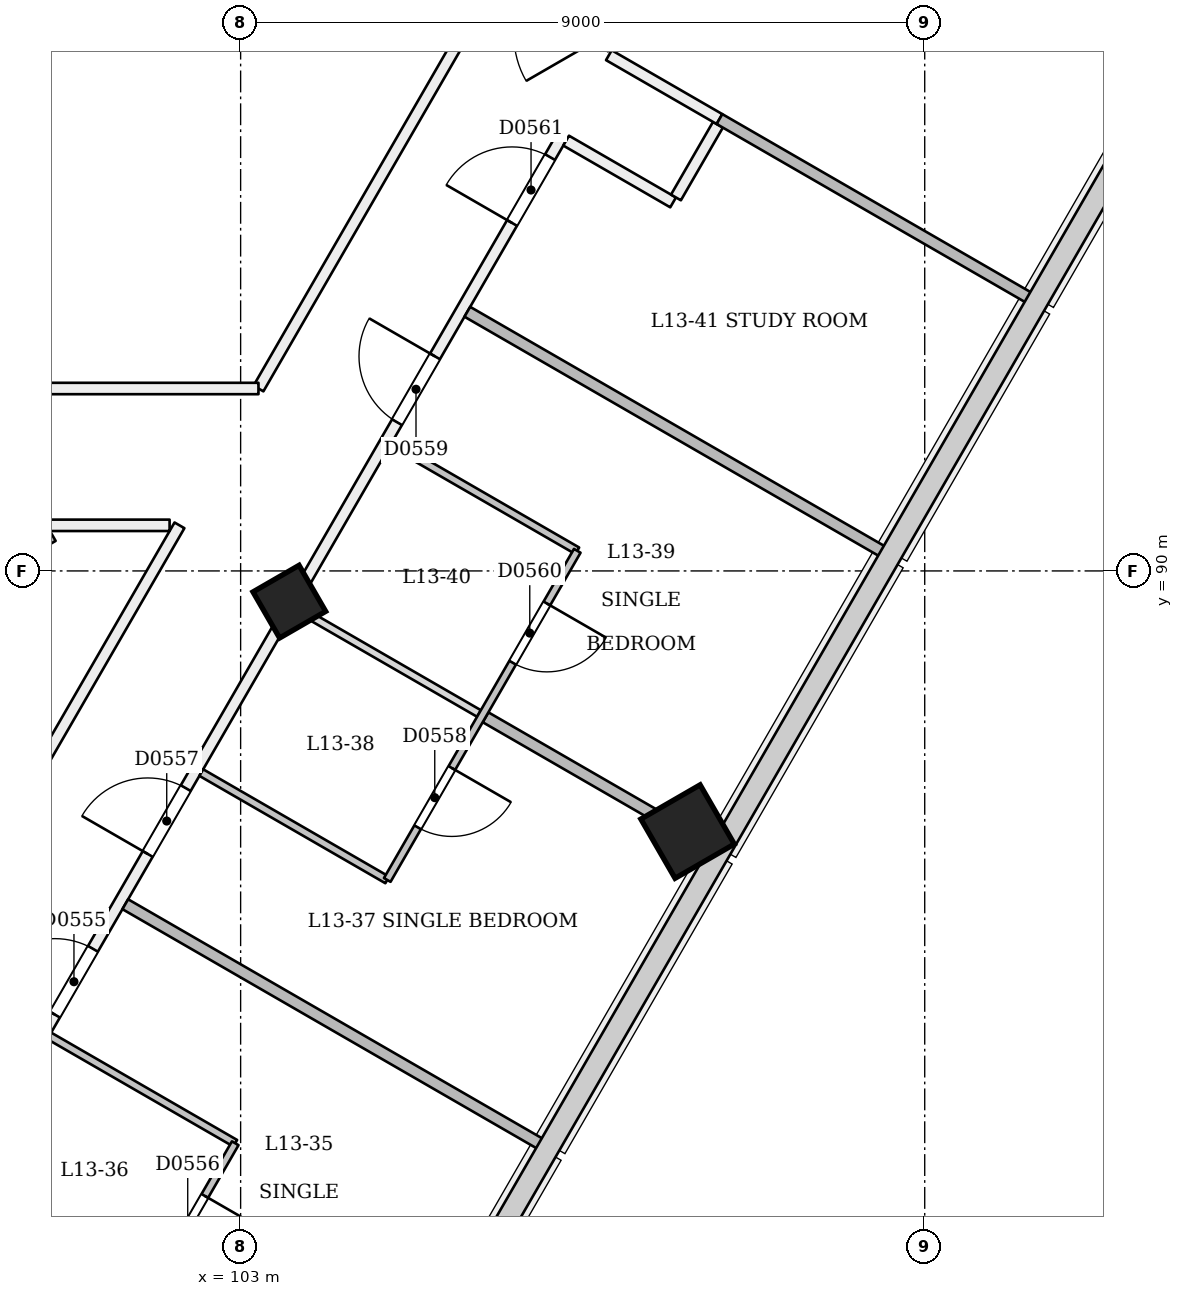
"""IFC4 building model, lengths in metres.
Left out: names, types, materials, properties, quantities, classifications, styles, units other than length and angle.
Written with IfcOpenShell. Run it as: python <this file> out.ifc"""

import sys

from ifc_helpers import new_model, si_unit, direction, frame, frame_2d, origin, origin_2d, place, context, subcontext, project, spatial, rectangle, extrude, element, fill, save


model = new_model("IFC4")
c1 = context("Model", 3, precision=1e-05, world=origin(), true_north=direction((0.0, 1.0)))
c2 = subcontext(c1, "Body", "Model", "MODEL_VIEW")
j1 = project(units=[si_unit("LENGTHUNIT", "METRE"), si_unit("PLANEANGLEUNIT", "RADIAN")], contexts=[c1])
p1 = place(None, origin())
s1 = spatial("IfcSite", under=j1, at=p1, CompositionType="ELEMENT")
p2 = place(p1, origin())
s2 = spatial("IfcBuilding", under=s1, at=p2, CompositionType="ELEMENT")
p3 = place(p2, frame((0.0, 0.0, 55.8)))
s3 = spatial("IfcBuildingStorey", under=s2, at=p3, CompositionType="ELEMENT", Elevation=55.8)
p4 = place(p3, frame((103.668, 89.549, -0.021), z_axis=(-0.022222852987, 0.038483477124, 0.999012095419), x_axis=(-0.500169988153, -0.86564211394, 0.022219665283)))
e1 = element("IfcColumn", 1, at=p4, inside=s3, PredefinedType="COLUMN", context=c2, shape_type="SweptSolid", body=[
    extrude(rectangle(XDim=0.7, YDim=0.7, at=origin_2d()), origin(), (0.0, 0.0, 1.0), 3.604),
])
p5 = place(p3, frame((108.907, 86.524, -0.027), z_axis=(-0.02215369191, 0.038413282303, 0.999016333038), x_axis=(-0.500652789846, -0.865364193428, 0.022171981242)))
e2 = element("IfcColumn", 2, at=p5, inside=s3, PredefinedType="COLUMN", context=c2, shape_type="SweptSolid", body=[
    extrude(rectangle(XDim=0.9, YDim=0.9, at=origin_2d()), origin(), (0.0, 0.0, 1.0), 3.604),
])
p6 = place(p3, frame((85.99, 58.932, 0.0), z_axis=(0.0, 0.0, 1.0), x_axis=(0.500001547762, 0.866024510182, 0.0)))
e3 = element("IfcWall", 3, at=p6, inside=s3, PredefinedType="PARTITIONING", context=c2, shape_type="SweptSolid", body=[
    extrude(rectangle(XDim=42.454, YDim=0.15, at=frame_2d((21.227, 0.0))), origin(), (0.0, 0.0, 1.0), 2.7),
])
p7 = place(p6, frame((3.577, 0.0, 0.0)))
e4 = element("IfcOpeningElement", 4, at=p7, cuts=e3, PredefinedType="OPENING", context=c2, shape_type="SweptSolid", body=[
    extrude(rectangle(XDim=1.2, YDim=2.1, at=frame_2d((0.6, 1.05))), frame((0.0, 0.085, 0.0), z_axis=(0.0, -1.0, 0.0), x_axis=(1.0, 0.0, 0.0)), (0.0, 0.0, 1.0), 0.171),
])
p8 = place(p6, frame((11.134, 0.0, 0.0)))
e5 = element("IfcOpeningElement", 5, at=p8, cuts=e3, PredefinedType="OPENING", context=c2, shape_type="SweptSolid", body=[
    extrude(rectangle(XDim=1.0, YDim=2.1, at=frame_2d((0.5, 1.05))), frame((0.0, 0.085, 0.0), z_axis=(0.0, -1.0, 0.0), x_axis=(1.0, 0.0, 0.0)), (0.0, 0.0, 1.0), 0.171),
])
p9 = place(p6, frame((13.575, 0.0, 0.0)))
e6 = element("IfcOpeningElement", 6, at=p9, cuts=e3, PredefinedType="OPENING", context=c2, shape_type="SweptSolid", body=[
    extrude(rectangle(XDim=1.0, YDim=2.1, at=frame_2d((0.5, 1.05))), frame((0.0, 0.085, 0.0), z_axis=(0.0, -1.0, 0.0), x_axis=(1.0, 0.0, 0.0)), (0.0, 0.0, 1.0), 0.171),
])
p10 = place(p6, frame((20.134, 0.0, 0.0)))
e7 = element("IfcOpeningElement", 7, at=p10, cuts=e3, PredefinedType="OPENING", context=c2, shape_type="SweptSolid", body=[
    extrude(rectangle(XDim=1.0, YDim=2.1, at=frame_2d((0.5, 1.05))), frame((0.0, 0.085, 0.0), z_axis=(0.0, -1.0, 0.0), x_axis=(1.0, 0.0, 0.0)), (0.0, 0.0, 1.0), 0.171),
])
p11 = place(p6, frame((22.575, 0.0, 0.0)))
e8 = element("IfcOpeningElement", 8, at=p11, cuts=e3, PredefinedType="OPENING", context=c2, shape_type="SweptSolid", body=[
    extrude(rectangle(XDim=1.0, YDim=2.1, at=frame_2d((0.5, 1.05))), frame((0.0, 0.085, 0.0), z_axis=(0.0, -1.0, 0.0), x_axis=(1.0, 0.0, 0.0)), (0.0, 0.0, 1.0), 0.171),
])
p12 = place(p6, frame((29.134, 0.0, 0.0)))
e9 = element("IfcOpeningElement", 9, at=p12, cuts=e3, PredefinedType="OPENING", context=c2, shape_type="SweptSolid", body=[
    extrude(rectangle(XDim=1.0, YDim=2.1, at=frame_2d((0.5, 1.05))), frame((0.0, 0.085, 0.0), z_axis=(0.0, -1.0, 0.0), x_axis=(1.0, 0.0, 0.0)), (0.0, 0.0, 1.0), 0.171),
])
p13 = place(p6, frame((31.575, 0.0, 0.0)))
e10 = element("IfcOpeningElement", 10, at=p13, cuts=e3, PredefinedType="OPENING", context=c2, shape_type="SweptSolid", body=[
    extrude(rectangle(XDim=1.0, YDim=2.1, at=frame_2d((0.5, 1.05))), frame((0.0, 0.085, 0.0), z_axis=(0.0, -1.0, 0.0), x_axis=(1.0, 0.0, 0.0)), (0.0, 0.0, 1.0), 0.171),
])
p14 = place(p6, frame((38.134, 0.0, 0.0)))
e11 = element("IfcOpeningElement", 11, at=p14, cuts=e3, PredefinedType="OPENING", context=c2, shape_type="SweptSolid", body=[
    extrude(rectangle(XDim=1.0, YDim=2.1, at=frame_2d((0.5, 1.05))), frame((0.0, 0.085, 0.0), z_axis=(0.0, -1.0, 0.0), x_axis=(1.0, 0.0, 0.0)), (0.0, 0.0, 1.0), 0.171),
])
p15 = place(p6, frame((41.161, 0.0, 0.0)))
e12 = element("IfcOpeningElement", 12, at=p15, cuts=e3, PredefinedType="OPENING", context=c2, shape_type="SweptSolid", body=[
    extrude(rectangle(XDim=1.0, YDim=2.1, at=frame_2d((0.5, 1.05))), frame((0.0, 0.085, 0.0), z_axis=(0.0, -1.0, 0.0), x_axis=(1.0, 0.0, 0.0)), (0.0, 0.0, 1.0), 0.171),
])
p16 = place(p3, frame((107.282, 95.661, 0.0), z_axis=(0.0, 0.0, 1.0), x_axis=(0.866015446554, -0.500017246033, 0.0)))
e13 = element("IfcWall", 13, at=p16, inside=s3, PredefinedType="PARTITIONING", context=c2, shape_type="SweptSolid", body=[
    extrude(rectangle(XDim=1.625, YDim=0.15, at=frame_2d((0.812, 0.0))), origin(), (0.0, 0.0, 1.0), 3.1),
])
p17 = place(p3, frame((108.727, 94.913, 0.0), z_axis=(0.0, 0.0, 1.0), x_axis=(0.499990325971, 0.866030989016, 0.0)))
e14 = element("IfcWall", 14, at=p17, inside=s3, PredefinedType="PARTITIONING", context=c2, shape_type="SweptSolid", body=[
    extrude(rectangle(XDim=1.104, YDim=0.15, at=frame_2d((0.552, 0.0))), origin(), (0.0, 0.0, 1.0), 3.1),
])
p18 = place(p3, frame((109.3, 95.945, 0.0), z_axis=(0.0, 0.0, 1.0), x_axis=(-0.865989548921, 0.500062097304, 0.0)))
e15 = element("IfcWall", 15, at=p18, inside=s3, PredefinedType="PARTITIONING", context=c2, shape_type="SweptSolid", body=[
    extrude(rectangle(XDim=1.68, YDim=0.15, at=frame_2d((0.84, 0.0))), origin(), (0.0, 0.0, 1.0), 3.1),
])
p19 = place(p3, frame((102.195, 90.6, 0.0), z_axis=(0.0, 0.0, 1.0), x_axis=(-0.499999873444, -0.866025476852, 0.0)))
e16 = element("IfcWall", 16, at=p19, inside=s3, PredefinedType="PARTITIONING", context=c2, shape_type="SweptSolid", body=[
    extrude(rectangle(XDim=17.064, YDim=0.15, at=frame_2d((8.532, 0.0))), origin(), (0.0, 0.0, 1.0), 3.1),
])
p20 = place(p19, frame((10.401, 0.0, 0.0)))
e17 = element("IfcOpeningElement", 17, at=p20, cuts=e16, PredefinedType="OPENING", context=c2, shape_type="SweptSolid", body=[
    extrude(rectangle(XDim=1.2, YDim=2.1, at=frame_2d((0.6, 1.05))), frame((0.0, 0.085, 0.0), z_axis=(0.0, -1.0, 0.0), x_axis=(1.0, 0.0, 0.0)), (0.0, 0.0, 1.0), 0.171),
])
p21 = place(p3, frame((105.817, 96.873, 0.0), z_axis=(0.0, 0.0, 1.0), x_axis=(-0.499992497538, -0.86602973529, 0.0)))
e18 = element("IfcWall", 18, at=p21, inside=s3, PredefinedType="PARTITIONING", context=c2, shape_type="SweptSolid", body=[
    extrude(rectangle(XDim=5.165, YDim=0.15, at=frame_2d((2.583, 0.0))), origin(), (0.0, 0.0, 1.0), 3.1),
])
p22 = place(p3, frame((103.235, 92.4, 0.0), z_axis=(0.0, 0.0, 1.0), x_axis=(-1.0, 0.0, 0.0)))
e19 = element("IfcWall", 19, at=p22, inside=s3, PredefinedType="PARTITIONING", context=c2, shape_type="SweptSolid", body=[
    extrude(rectangle(XDim=3.36, YDim=0.15, at=frame_2d((1.68, 0.0))), origin(), (0.0, 0.0, 1.0), 3.1),
])
p23 = place(p3, frame((88.0, 90.599, 0.0), z_axis=(0.0, 0.0, 1.0), x_axis=(0.99999999759, 6.942998e-05, 0.0)))
e20 = element("IfcWall", 20, at=p23, inside=s3, PredefinedType="PARTITIONING", context=c2, shape_type="SweptSolid", body=[
    extrude(rectangle(XDim=14.065, YDim=0.15, at=frame_2d((7.033, 0.0))), origin(), (0.0, 0.0, 1.0), 3.1),
])
p24 = place(p23, frame((3.476, 0.0, 0.0)))
e21 = element("IfcOpeningElement", 21, at=p24, cuts=e20, PredefinedType="OPENING", context=c2, shape_type="SweptSolid", body=[
    extrude(rectangle(XDim=1.2, YDim=2.1, at=frame_2d((0.6, 1.05))), frame((0.0, 0.085, 0.0), z_axis=(0.0, -1.0, 0.0), x_axis=(1.0, 0.0, 0.0)), (0.0, 0.0, 1.0), 0.171),
])
p25 = place(p3, frame((101.636, 80.331, 0.0), z_axis=(0.0, 0.0, 1.0), x_axis=(-0.866042014628, 0.499971228071, 0.0)))
e22 = element("IfcWall", 22, at=p25, inside=s3, PredefinedType="PARTITIONING", context=c2, shape_type="SweptSolid", body=[
    extrude(rectangle(XDim=2.775, YDim=0.1, at=frame_2d((1.388, 0.0))), origin(), (0.0, 0.0, 1.0), 2.7),
])
p26 = place(p3, frame((100.482, 83.883, 0.0), z_axis=(0.0, 0.0, 1.0), x_axis=(0.866011447264, -0.500024172624, 0.0)))
e23 = element("IfcWall", 23, at=p26, inside=s3, PredefinedType="PARTITIONING", context=c2, shape_type="SweptSolid", body=[
    extrude(rectangle(XDim=2.825, YDim=0.1, at=frame_2d((1.413, 0.0))), origin(), (0.0, 0.0, 1.0), 3.1),
])
p27 = place(p3, frame((102.929, 82.47, 0.0), z_axis=(0.0, 0.0, 1.0), x_axis=(-0.500004234368, -0.866022959057, 0.0)))
e24 = element("IfcWall", 24, at=p27, inside=s3, PredefinedType="PARTITIONING", context=c2, shape_type="SweptSolid", body=[
    extrude(rectangle(XDim=5.0, YDim=0.1, at=frame_2d((2.5, 0.0))), origin(), (0.0, 0.0, 1.0), 2.7),
])
p28 = place(p27, frame((3.3, 0.0, 0.0)))
e25 = element("IfcOpeningElement", 25, at=p28, cuts=e24, PredefinedType="OPENING", context=c2, shape_type="SweptSolid", body=[
    extrude(rectangle(XDim=0.9, YDim=2.1, at=frame_2d((0.45, 1.05))), frame((0.0, 0.061, 0.0), z_axis=(0.0, -1.0, 0.0), x_axis=(1.0, 0.0, 0.0)), (0.0, 0.0, 1.0), 0.121),
])
p29 = place(p27, frame((0.8, 0.0, 0.0)))
e26 = element("IfcOpeningElement", 26, at=p29, cuts=e24, PredefinedType="OPENING", context=c2, shape_type="SweptSolid", body=[
    extrude(rectangle(XDim=0.9, YDim=2.1, at=frame_2d((0.45, 1.05))), frame((0.0, 0.061, 0.0), z_axis=(0.0, -1.0, 0.0), x_axis=(1.0, 0.0, 0.0)), (0.0, 0.0, 1.0), 0.121),
])
p30 = place(p3, frame((106.978, 82.442, 0.0), z_axis=(0.0, 0.0, 1.0), x_axis=(-0.866025401434, 0.500000004071, 0.0)))
e27 = element("IfcWall", 27, at=p30, inside=s3, PredefinedType="PARTITIONING", context=c2, shape_type="SweptSolid", body=[
    extrude(rectangle(XDim=6.345, YDim=0.15, at=frame_2d((3.173, 0.0))), origin(), (0.0, 0.0, 1.0), 2.6),
])
p31 = place(p3, frame((104.929, 85.935, 0.0), z_axis=(0.0, 0.0, 1.0), x_axis=(-0.866011447264, 0.500024172624, 0.0)))
e28 = element("IfcWall", 28, at=p31, inside=s3, PredefinedType="PARTITIONING", context=c2, shape_type="SweptSolid", body=[
    extrude(rectangle(XDim=2.825, YDim=0.1, at=frame_2d((1.413, 0.0))), origin(), (0.0, 0.0, 1.0), 3.1),
])
p32 = place(p3, frame((109.21, 86.35, 0.0), z_axis=(0.0, 0.0, 1.0), x_axis=(-0.866013532718, 0.500020560727, 0.0)))
e29 = element("IfcWall", 29, at=p32, inside=s3, PredefinedType="PARTITIONING", context=c2, shape_type="SweptSolid", body=[
    extrude(rectangle(XDim=3.45, YDim=0.15, at=frame_2d((1.725, 0.0))), origin(), (0.0, 0.0, 1.0), 2.6),
])
p33 = place(p3, frame((106.136, 88.125, 0.0), z_axis=(0.0, 0.0, 1.0), x_axis=(-0.866042014628, 0.499971228071, 0.0)))
e30 = element("IfcWall", 30, at=p33, inside=s3, PredefinedType="PARTITIONING", context=c2, shape_type="SweptSolid", body=[
    extrude(rectangle(XDim=2.775, YDim=0.1, at=frame_2d((1.388, 0.0))), origin(), (0.0, 0.0, 1.0), 2.7),
])
p34 = place(p3, frame((104.982, 91.677, 0.0), z_axis=(0.0, 0.0, 1.0), x_axis=(0.866048868473, -0.499959355765, 0.0)))
e31 = element("IfcWall", 31, at=p34, inside=s3, PredefinedType="PARTITIONING", context=c2, shape_type="SweptSolid", body=[
    extrude(rectangle(XDim=2.825, YDim=0.1, at=frame_2d((1.413, 0.0))), origin(), (0.0, 0.0, 1.0), 3.1),
])
p35 = place(p3, frame((107.429, 90.265, 0.0), z_axis=(0.0, 0.0, 1.0), x_axis=(-0.499983091616, -0.866035165624, 0.0)))
e32 = element("IfcWall", 32, at=p35, inside=s3, PredefinedType="PARTITIONING", context=c2, shape_type="SweptSolid", body=[
    extrude(rectangle(XDim=5.0, YDim=0.1, at=frame_2d((2.5, 0.0))), origin(), (0.0, 0.0, 1.0), 2.7),
])
p36 = place(p35, frame((3.3, 0.0, 0.0)))
e33 = element("IfcOpeningElement", 33, at=p36, cuts=e32, PredefinedType="OPENING", context=c2, shape_type="SweptSolid", body=[
    extrude(rectangle(XDim=0.9, YDim=2.1, at=frame_2d((0.45, 1.05))), frame((0.0, 0.061, 0.0), z_axis=(0.0, -1.0, 0.0), x_axis=(1.0, 0.0, 0.0)), (0.0, 0.0, 1.0), 0.121),
])
p37 = place(p35, frame((0.8, 0.0, 0.0)))
e34 = element("IfcOpeningElement", 34, at=p37, cuts=e32, PredefinedType="OPENING", context=c2, shape_type="SweptSolid", body=[
    extrude(rectangle(XDim=0.9, YDim=2.1, at=frame_2d((0.45, 1.05))), frame((0.0, 0.061, 0.0), z_axis=(0.0, -1.0, 0.0), x_axis=(1.0, 0.0, 0.0)), (0.0, 0.0, 1.0), 0.121),
])
p38 = place(p3, frame((111.478, 90.237, 0.0), z_axis=(0.0, 0.0, 1.0), x_axis=(-0.866025401434, 0.500000004071, 0.0)))
e35 = element("IfcWall", 35, at=p38, inside=s3, PredefinedType="PARTITIONING", context=c2, shape_type="SweptSolid", body=[
    extrude(rectangle(XDim=6.345, YDim=0.15, at=frame_2d((3.173, 0.0))), origin(), (0.0, 0.0, 1.0), 2.6),
])
p39 = place(p3, frame((113.405, 93.575, 0.0), z_axis=(0.0, 0.0, 1.0), x_axis=(-0.866028632512, 0.499994407638, 0.0)))
e36 = element("IfcWall", 36, at=p39, inside=s3, PredefinedType="PARTITIONING", context=c2, shape_type="SweptSolid", body=[
    extrude(rectangle(XDim=4.74, YDim=0.15, at=frame_2d((2.37, 0.0))), origin(), (0.0, 0.0, 1.0), 2.6),
])
p40 = place(p3, frame((100.529, 90.46, 0.0), z_axis=(0.0, 0.0, 1.0), x_axis=(-0.866026416576, -0.499998245789, 0.0)))
e37 = element("IfcWall", 37, at=p40, inside=s3, PredefinedType="PARTITIONING", context=c2, shape_type="SweptSolid", body=[
    extrude(rectangle(XDim=26.59, YDim=0.15, at=frame_2d((13.295, 0.0))), origin(), (0.0, 0.0, 1.0), 3.1),
])
p41 = place(p12, origin())
e38 = element("IfcDoor", 38, at=p41, inside=s3, OperationType="SINGLE_SWING_LEFT", PredefinedType="NOTDEFINED", context=c2, shape_type="SweptSolid", body=[
    extrude(rectangle(XDim=1.0, YDim=2.1, at=frame_2d((0.5, 1.05))), frame((0.0, 0.025, 0.0), z_axis=(0.0, -1.0, 0.0), x_axis=(1.0, 0.0, 0.0)), (0.0, 0.0, 1.0), 0.05),
])
fill(e9, e38)
p42 = place(p29, origin())
e39 = element("IfcDoor", 39, at=p42, inside=s3, OperationType="SINGLE_SWING_LEFT", PredefinedType="NOTDEFINED", context=c2, shape_type="SweptSolid", body=[
    extrude(rectangle(XDim=0.9, YDim=2.1, at=frame_2d((0.45, 1.05))), frame((0.0, 0.025, 0.0), z_axis=(0.0, -1.0, 0.0), x_axis=(1.0, 0.0, 0.0)), (0.0, 0.0, 1.0), 0.05),
])
fill(e26, e39)
p43 = place(p13, origin())
e40 = element("IfcDoor", 40, at=p43, inside=s3, OperationType="SINGLE_SWING_LEFT", PredefinedType="NOTDEFINED", context=c2, shape_type="SweptSolid", body=[
    extrude(rectangle(XDim=1.0, YDim=2.1, at=frame_2d((0.5, 1.05))), frame((0.0, 0.025, 0.0), z_axis=(0.0, -1.0, 0.0), x_axis=(1.0, 0.0, 0.0)), (0.0, 0.0, 1.0), 0.05),
])
fill(e10, e40)
p44 = place(p36, origin())
e41 = element("IfcDoor", 41, at=p44, inside=s3, OperationType="SINGLE_SWING_LEFT", PredefinedType="NOTDEFINED", context=c2, shape_type="SweptSolid", body=[
    extrude(rectangle(XDim=0.9, YDim=2.1, at=frame_2d((0.45, 1.05))), frame((0.0, 0.025, 0.0), z_axis=(0.0, -1.0, 0.0), x_axis=(1.0, 0.0, 0.0)), (0.0, 0.0, 1.0), 0.05),
])
fill(e33, e41)
p45 = place(p14, origin())
e42 = element("IfcDoor", 42, at=p45, inside=s3, OperationType="SINGLE_SWING_RIGHT", PredefinedType="NOTDEFINED", context=c2, shape_type="SweptSolid", body=[
    extrude(rectangle(XDim=1.0, YDim=2.1, at=frame_2d((0.5, 1.05))), frame((0.0, 0.025, 0.0), z_axis=(0.0, -1.0, 0.0), x_axis=(1.0, 0.0, 0.0)), (0.0, 0.0, 1.0), 0.05),
])
fill(e11, e42)
p46 = place(p37, origin())
e43 = element("IfcDoor", 43, at=p46, inside=s3, OperationType="SINGLE_SWING_LEFT", PredefinedType="NOTDEFINED", context=c2, shape_type="SweptSolid", body=[
    extrude(rectangle(XDim=0.9, YDim=2.1, at=frame_2d((0.45, 1.05))), frame((0.0, 0.025, 0.0), z_axis=(0.0, -1.0, 0.0), x_axis=(1.0, 0.0, 0.0)), (0.0, 0.0, 1.0), 0.05),
])
fill(e34, e43)
p47 = place(p15, origin())
e44 = element("IfcDoor", 44, at=p47, inside=s3, OperationType="SINGLE_SWING_LEFT", PredefinedType="NOTDEFINED", context=c2, shape_type="SweptSolid", body=[
    extrude(rectangle(XDim=1.0, YDim=2.1, at=frame_2d((0.5, 1.05))), frame((0.0, 0.025, 0.0), z_axis=(0.0, -1.0, 0.0), x_axis=(1.0, 0.0, 0.0)), (0.0, 0.0, 1.0), 0.05),
])
fill(e12, e44)
save(model, sys.argv[1])
